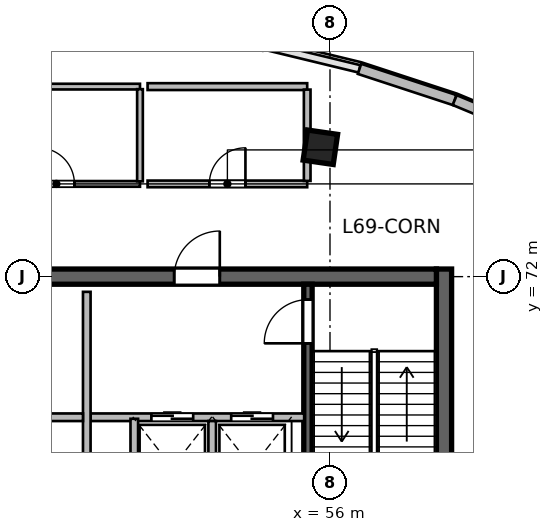
"""IFC4 building model, lengths in metres.
Left out: names, types, materials, properties, quantities, classifications, styles, units other than length and angle.
Written with IfcOpenShell. Run it as: python <this file> out.ifc"""

import sys

from ifc_helpers import new_model, si_unit, direction, frame, frame_2d, origin, origin_2d, place, context, subcontext, project, spatial, rectangle, extrude, source, transform, mapped, element, fill, save


model = new_model("IFC4")
c1 = context("Model", 3, precision=1e-05, world=origin(), true_north=direction((0.0, 1.0)))
c2 = subcontext(c1, "Body", "Model", "MODEL_VIEW")
j1 = project(units=[si_unit("LENGTHUNIT", "METRE"), si_unit("PLANEANGLEUNIT", "RADIAN")], contexts=[c1])
p1 = place(None, origin())
s1 = spatial("IfcSite", under=j1, at=p1, CompositionType="ELEMENT")
p2 = place(p1, origin())
s2 = spatial("IfcBuilding", under=s1, at=p2, CompositionType="ELEMENT")
p3 = place(p2, frame((0.0, 0.0, 283.5)))
s3 = spatial("IfcBuildingStorey", under=s2, at=p3, CompositionType="ELEMENT", Elevation=283.5)
m1 = source(origin(), c2, "Body", "SweptSolid", [
    extrude(rectangle(XDim=12.0, YDim=0.4, at=frame_2d((6.0, 0.0))), origin(), (0.0, 0.0, 1.0), 3.9),
])
p4 = place(p3, frame((59.0, 60.2, 0.0), z_axis=(0.0, 0.0, 1.0), x_axis=(0.0, 1.0, 0.0)))
e1 = element("IfcWall", 1, at=p4, inside=s3, PredefinedType="SHEAR", context=c2, shape_type="MappedRepresentation", body=[
    mapped(m1, transform((0.0, 0.0, 0.0), scale=1.0)),
])
m2 = source(origin(), c2, "Body", "SweptSolid", [
    extrude(rectangle(XDim=21.6, YDim=0.4, at=frame_2d((10.8, 0.0))), origin(), (0.0, 0.0, 1.0), 3.9),
])
p5 = place(p3, frame((37.2, 72.0, 0.0), z_axis=(0.0, 0.0, 1.0), x_axis=(1.0, 0.0, 0.0)))
e2 = element("IfcWall", 2, at=p5, inside=s3, PredefinedType="SHEAR", context=c2, shape_type="MappedRepresentation", body=[
    mapped(m2, transform((0.0, 0.0, 0.0), scale=1.0)),
])
p6 = place(p5, frame((1.2, 0.0, 0.0)))
e3 = element("IfcOpeningElement", 3, at=p6, cuts=e2, PredefinedType="OPENING", context=c2, shape_type="SweptSolid", body=[
    extrude(rectangle(XDim=0.9, YDim=2.1, at=frame_2d((0.45, 1.05))), frame((0.0, 0.21, 0.0), z_axis=(0.0, -1.0, 0.0), x_axis=(1.0, 0.0, 0.0)), (0.0, 0.0, 1.0), 0.42),
])
p7 = place(p5, frame((14.7, 0.0, 0.0)))
e4 = element("IfcOpeningElement", 4, at=p7, cuts=e2, PredefinedType="OPENING", context=c2, shape_type="SweptSolid", body=[
    extrude(rectangle(XDim=1.2, YDim=2.15, at=frame_2d((0.6, 1.075))), frame((0.0, 0.21, 0.0), z_axis=(0.0, -1.0, 0.0), x_axis=(1.0, 0.0, 0.0)), (0.0, 0.0, 1.0), 0.42),
])
p8 = place(p5, frame((4.15, 0.0, 0.0)))
e5 = element("IfcOpeningElement", 5, at=p8, cuts=e2, PredefinedType="OPENING", context=c2, shape_type="SweptSolid", body=[
    extrude(rectangle(XDim=1.3, YDim=2.15, at=frame_2d((0.65, 1.075))), frame((0.0, 0.21, 0.0), z_axis=(0.0, -1.0, 0.0), x_axis=(1.0, 0.0, 0.0)), (0.0, 0.0, 1.0), 0.42),
])
p9 = place(p5, frame((7.25, 0.0, 0.0)))
e6 = element("IfcOpeningElement", 6, at=p9, cuts=e2, PredefinedType="OPENING", context=c2, shape_type="SweptSolid", body=[
    extrude(rectangle(XDim=0.9, YDim=2.1, at=frame_2d((0.45, 1.05))), frame((0.0, 0.21, 0.0), z_axis=(0.0, -1.0, 0.0), x_axis=(1.0, 0.0, 0.0)), (0.0, 0.0, 1.0), 0.42),
])
m3 = source(origin(), c2, "Body", "SweptSolid", [
    extrude(rectangle(XDim=11.2, YDim=0.22, at=frame_2d((5.6, 0.0))), origin(), (0.0, 0.0, 1.0), 3.9),
])
p10 = place(p3, frame((55.42, 60.6, 0.0), z_axis=(0.0, 0.0, 1.0), x_axis=(0.0, 1.0, 0.0)))
e7 = element("IfcWall", 7, at=p10, inside=s3, PredefinedType="SHEAR", context=c2, shape_type="MappedRepresentation", body=[
    mapped(m3, transform((0.0, 0.0, 0.0), scale=1.0)),
])
p11 = place(p10, frame((9.645, 0.0, 0.0)))
e8 = element("IfcOpeningElement", 8, at=p11, cuts=e7, PredefinedType="OPENING", context=c2, shape_type="SweptSolid", body=[
    extrude(rectangle(XDim=1.15, YDim=2.15, at=frame_2d((0.575, 1.075))), frame((0.0, 0.12, 0.0), z_axis=(0.0, -1.0, 0.0), x_axis=(1.0, 0.0, 0.0)), (0.0, 0.0, 1.0), 0.24),
])
m4 = source(origin(), c2, "Body", "SweptSolid", [
    extrude(rectangle(XDim=0.8, YDim=0.8, at=origin_2d()), origin(), (0.0, 0.0, 1.0), 3.9),
])
p12 = place(p3, frame((55.747, 75.404, 0.0), z_axis=(0.0, 0.0, 1.0), x_axis=(0.143492621991, 0.98965138682, 0.0)))
e9 = element("IfcColumn", 9, at=p12, inside=s3, PredefinedType="COLUMN", context=c2, shape_type="MappedRepresentation", body=[
    mapped(m4, transform((0.0, 0.0, 0.0), scale=1.0)),
])
m5 = source(origin(), c2, "Body", "SweptSolid", [
    extrude(rectangle(XDim=2.636, YDim=0.28, at=frame_2d((1.318, 0.0))), origin(), (0.0, 0.0, 1.0), 3.64),
])
p13 = place(p3, frame((56.777, 77.467, 0.0), z_axis=(0.0, 0.0, 1.0), x_axis=(0.950200321617, -0.311639774097, 0.0)))
e10 = element("IfcWall", 10, at=p13, inside=s3, PredefinedType="SOLIDWALL", context=c2, shape_type="MappedRepresentation", body=[
    mapped(m5, transform((0.0, 0.0, 0.0), scale=1.0)),
])
m6 = source(origin(), c2, "Body", "SweptSolid", [
    extrude(rectangle(XDim=2.668, YDim=0.28, at=frame_2d((1.334, 0.0))), origin(), (0.0, 0.0, 1.0), 3.64),
])
p14 = place(p3, frame((59.281, 76.645, 0.0), z_axis=(0.0, 0.0, 1.0), x_axis=(0.923290633029, -0.384102078828, 0.0)))
e11 = element("IfcWall", 11, at=p14, inside=s3, PredefinedType="SOLIDWALL", context=c2, shape_type="MappedRepresentation", body=[
    mapped(m6, transform((0.0, 0.0, 0.0), scale=1.0)),
])
m7 = source(origin(), c2, "Body", "SweptSolid", [
    extrude(rectangle(XDim=5.62, YDim=0.2, at=frame_2d((2.81, 0.0))), origin(), (0.0, 0.0, 1.0), 3.64),
])
p15 = place(p3, frame((49.7, 68.3, 0.0), z_axis=(0.0, 0.0, 1.0), x_axis=(1.0, 0.0, 0.0)))
e12 = element("IfcWall", 12, at=p15, inside=s3, PredefinedType="SOLIDWALL", context=c2, shape_type="MappedRepresentation", body=[
    mapped(m7, transform((0.0, 0.0, 0.0), scale=1.0)),
])
p16 = place(p15, frame((1.6, 0.0, 0.0)))
e13 = element("IfcOpeningElement", 13, at=p16, cuts=e12, PredefinedType="OPENING", context=c2, shape_type="SweptSolid", body=[
    extrude(rectangle(XDim=1.1, YDim=2.15, at=frame_2d((0.55, 1.075))), frame((0.0, 0.11, 0.0), z_axis=(0.0, -1.0, 0.0), x_axis=(1.0, 0.0, 0.0)), (0.0, 0.0, 1.0), 0.22),
])
p17 = place(p15, frame((3.7, 0.0, 0.0)))
e14 = element("IfcOpeningElement", 14, at=p17, cuts=e12, PredefinedType="OPENING", context=c2, shape_type="SweptSolid", body=[
    extrude(rectangle(XDim=1.1, YDim=2.15, at=frame_2d((0.55, 1.075))), frame((0.0, 0.11, 0.0), z_axis=(0.0, -1.0, 0.0), x_axis=(1.0, 0.0, 0.0)), (0.0, 0.0, 1.0), 0.22),
])
m8 = source(origin(), c2, "Body", "SweptSolid", [
    extrude(rectangle(XDim=5.8, YDim=0.2, at=frame_2d((2.9, 0.0))), origin(), (0.0, 0.0, 1.0), 3.64),
])
p18 = place(p3, frame((49.6, 65.8, 0.0), z_axis=(0.0, 0.0, 1.0), x_axis=(0.0, 1.0, 0.0)))
e15 = element("IfcWall", 15, at=p18, inside=s3, PredefinedType="SOLIDWALL", context=c2, shape_type="MappedRepresentation", body=[
    mapped(m8, transform((0.0, 0.0, 0.0), scale=1.0)),
])
m9 = source(origin(), c2, "Body", "SweptSolid", [
    extrude(rectangle(XDim=2.58, YDim=0.2, at=frame_2d((1.29, 0.0))), origin(), (0.0, 0.0, 1.0), 3.64),
])
p19 = place(p3, frame((50.85, 65.68, 0.0), z_axis=(0.0, 0.0, 1.0), x_axis=(0.0, 1.0, 0.0)))
e16 = element("IfcWall", 16, at=p19, inside=s3, PredefinedType="SOLIDWALL", context=c2, shape_type="MappedRepresentation", body=[
    mapped(m9, transform((0.0, 0.0, 0.0), scale=1.0)),
])
m10 = source(origin(), c2, "Body", "SweptSolid", [
    extrude(rectangle(XDim=2.4, YDim=0.2, at=frame_2d((1.2, 0.0))), origin(), (0.0, 0.0, 1.0), 3.64),
])
p20 = place(p3, frame((52.9, 65.8, 0.0), z_axis=(0.0, 0.0, 1.0), x_axis=(0.0, 1.0, 0.0)))
e17 = element("IfcWall", 17, at=p20, inside=s3, PredefinedType="SOLIDWALL", context=c2, shape_type="MappedRepresentation", body=[
    mapped(m10, transform((0.0, 0.0, 0.0), scale=1.0)),
])
m11 = source(origin(), c2, "Body", "SweptSolid", [
    extrude(rectangle(XDim=8.8, YDim=0.2, at=frame_2d((4.4, 0.0))), origin(), (0.0, 0.0, 1.0), 3.64),
])
p21 = place(p3, frame((40.7, 68.3, 0.0), z_axis=(0.0, 0.0, 1.0), x_axis=(1.0, 0.0, 0.0)))
e18 = element("IfcWall", 18, at=p21, inside=s3, PredefinedType="SOLIDWALL", context=c2, shape_type="MappedRepresentation", body=[
    mapped(m11, transform((0.0, 0.0, 0.0), scale=1.0)),
])
m12 = source(origin(), c2, "Body", "SweptSolid", [
    extrude(rectangle(XDim=4.4, YDim=0.15, at=frame_2d((2.2, 0.0))), origin(), (0.0, 0.0, 1.0), 3.64),
])
p22 = place(p3, frame((46.6, 74.44, 0.0), z_axis=(0.0, 0.0, 1.0), x_axis=(1.0, 0.0, 0.0)))
e19 = element("IfcWall", 19, at=p22, inside=s3, PredefinedType="PARTITIONING", context=c2, shape_type="MappedRepresentation", body=[
    mapped(m12, transform((0.0, 0.0, 0.0), scale=1.0)),
])
p23 = place(p22, frame((1.725, 0.0, 0.0)))
e20 = element("IfcOpeningElement", 20, at=p23, cuts=e19, PredefinedType="OPENING", context=c2, shape_type="SweptSolid", body=[
    extrude(rectangle(XDim=0.95, YDim=2.1, at=frame_2d((0.475, 1.05))), frame((0.0, 0.085, 0.0), z_axis=(0.0, -1.0, 0.0), x_axis=(1.0, 0.0, 0.0)), (0.0, 0.0, 1.0), 0.17),
])
p24 = place(p3, frame((46.6, 77.0, 0.0), z_axis=(0.0, 0.0, 1.0), x_axis=(1.0, 0.0, 0.0)))
e21 = element("IfcWall", 21, at=p24, inside=s3, PredefinedType="PARTITIONING", context=c2, shape_type="MappedRepresentation", body=[
    mapped(m12, transform((0.0, 0.0, 0.0), scale=1.0)),
])
m13 = source(origin(), c2, "Body", "SweptSolid", [
    extrude(rectangle(XDim=2.425, YDim=0.15, at=frame_2d((1.212, 0.0))), origin(), (0.0, 0.0, 1.0), 3.64),
])
p25 = place(p3, frame((51.0, 74.508, 0.0), z_axis=(0.0, 0.0, 1.0), x_axis=(0.0, 1.0, 0.0)))
e22 = element("IfcWall", 22, at=p25, inside=s3, PredefinedType="PARTITIONING", context=c2, shape_type="MappedRepresentation", body=[
    mapped(m13, transform((0.0, 0.0, 0.0), scale=1.0)),
])
m14 = source(origin(), c2, "Body", "SweptSolid", [
    extrude(rectangle(XDim=4.2, YDim=0.175, at=frame_2d((2.1, 0.0))), origin(), (0.0, 0.0, 1.0), 3.64),
])
p26 = place(p3, frame((51.2, 74.44, 0.0), z_axis=(0.0, 0.0, 1.0), x_axis=(1.0, 0.0, 0.0)))
e23 = element("IfcWall", 23, at=p26, inside=s3, PredefinedType="PARTITIONING", context=c2, shape_type="MappedRepresentation", body=[
    mapped(m14, transform((0.0, 0.0, 0.0), scale=1.0)),
])
p27 = place(p26, frame((1.625, 0.0, 0.0)))
e24 = element("IfcOpeningElement", 24, at=p27, cuts=e23, PredefinedType="OPENING", context=c2, shape_type="SweptSolid", body=[
    extrude(rectangle(XDim=0.95, YDim=2.12, at=frame_2d((0.475, 1.06))), frame((0.0, 0.098, 0.0), z_axis=(0.0, -1.0, 0.0), x_axis=(1.0, 0.0, 0.0)), (0.0, 0.0, 1.0), 0.195),
])
m15 = source(origin(), c2, "Body", "SweptSolid", [
    extrude(rectangle(XDim=4.2, YDim=0.18, at=frame_2d((2.1, 0.0))), origin(), (0.0, 0.0, 1.0), 3.64),
])
p28 = place(p3, frame((51.2, 77.0, 0.0), z_axis=(0.0, 0.0, 1.0), x_axis=(1.0, 0.0, 0.0)))
e25 = element("IfcWall", 25, at=p28, inside=s3, PredefinedType="PLUMBINGWALL", context=c2, shape_type="MappedRepresentation", body=[
    mapped(m15, transform((0.0, 0.0, 0.0), scale=1.0)),
])
m16 = source(origin(), c2, "Body", "SweptSolid", [
    extrude(rectangle(XDim=2.403, YDim=0.175, at=frame_2d((1.201, 0.0))), origin(), (0.0, 0.0, 1.0), 3.64),
])
p29 = place(p3, frame((55.4, 74.519, 0.0), z_axis=(0.0, 0.0, 1.0), x_axis=(0.0, 1.0, 0.0)))
e26 = element("IfcWall", 26, at=p29, inside=s3, PredefinedType="PARTITIONING", context=c2, shape_type="MappedRepresentation", body=[
    mapped(m16, transform((0.0, 0.0, 0.0), scale=1.0)),
])
m17 = source(origin(), c2, "Body", "SweptSolid", [
    extrude(rectangle(XDim=12.307, YDim=0.195, at=frame_2d((6.153, 0.0))), origin(), (0.0, 0.0, 1.0), 3.64),
])
p30 = place(p3, frame((59.5, 63.216, 0.0), z_axis=(0.0, 0.0, 1.0), x_axis=(0.268768150257, 0.96320490105, 0.0)))
e27 = element("IfcWall", 27, at=p30, inside=s3, PredefinedType="PARTITIONING", context=c2, shape_type="MappedRepresentation", body=[
    mapped(m17, transform((0.0, 0.0, 0.0), scale=1.0)),
])
m18 = source(origin(), c2, "Body", "SweptSolid", [
    extrude(rectangle(XDim=1.15, YDim=2.15, at=frame_2d((0.575, 1.075))), frame((0.0, 0.025, 0.0), z_axis=(0.0, -1.0, 0.0), x_axis=(1.0, 0.0, 0.0)), (0.0, 0.0, 1.0), 0.05),
])
p31 = place(p11, origin())
e28 = element("IfcDoor", 28, at=p31, inside=s3, OperationType="SINGLE_SWING_LEFT", PredefinedType="DOOR", context=c2, shape_type="MappedRepresentation", body=[
    mapped(m18, transform((0.0, 0.0, 0.0), scale=1.0)),
])
fill(e8, e28)
m19 = source(origin(), c2, "Body", "SweptSolid", [
    extrude(rectangle(XDim=1.2, YDim=2.15, at=frame_2d((0.6, 1.075))), frame((0.0, 0.025, 0.0), z_axis=(0.0, -1.0, 0.0), x_axis=(1.0, 0.0, 0.0)), (0.0, 0.0, 1.0), 0.05),
])
p32 = place(p7, origin())
e29 = element("IfcDoor", 29, at=p32, inside=s3, OperationType="SINGLE_SWING_RIGHT", PredefinedType="DOOR", context=c2, shape_type="MappedRepresentation", body=[
    mapped(m19, transform((0.0, 0.0, 0.0), scale=1.0)),
])
fill(e4, e29)
m20 = source(origin(), c2, "Body", "SweptSolid", [
    extrude(rectangle(XDim=1.1, YDim=2.15, at=frame_2d((0.55, 1.075))), frame((0.0, 0.025, 0.0), z_axis=(0.0, -1.0, 0.0), x_axis=(1.0, 0.0, 0.0)), (0.0, 0.0, 1.0), 0.05),
])
p33 = place(p16, origin())
e30 = element("IfcDoor", 30, at=p33, inside=s3, OperationType="DOUBLE_DOOR_SLIDING", PredefinedType="DOOR", context=c2, shape_type="MappedRepresentation", body=[
    mapped(m20, transform((0.0, 0.0, 0.0), scale=1.0)),
])
fill(e13, e30)
p34 = place(p17, origin())
e31 = element("IfcDoor", 31, at=p34, inside=s3, OperationType="DOUBLE_DOOR_SLIDING", PredefinedType="DOOR", context=c2, shape_type="MappedRepresentation", body=[
    mapped(m20, transform((0.0, 0.0, 0.0), scale=1.0)),
])
fill(e14, e31)
m21 = source(origin(), c2, "Body", "SweptSolid", [
    extrude(rectangle(XDim=0.95, YDim=2.1, at=frame_2d((0.475, 1.05))), frame((0.0, 0.025, 0.0), z_axis=(0.0, -1.0, 0.0), x_axis=(1.0, 0.0, 0.0)), (0.0, 0.0, 1.0), 0.05),
])
p35 = place(p23, origin())
e32 = element("IfcDoor", 32, at=p35, inside=s3, OperationType="SINGLE_SWING_LEFT", PredefinedType="DOOR", context=c2, shape_type="MappedRepresentation", body=[
    mapped(m21, transform((0.0, 0.0, 0.0), scale=1.0)),
])
fill(e20, e32)
m22 = source(origin(), c2, "Body", "SweptSolid", [
    extrude(rectangle(XDim=0.95, YDim=2.12, at=frame_2d((0.475, 1.06))), frame((0.0, 0.025, 0.0), z_axis=(0.0, -1.0, 0.0), x_axis=(1.0, 0.0, 0.0)), (0.0, 0.0, 1.0), 0.05),
])
p36 = place(p27, origin())
e33 = element("IfcDoor", 33, at=p36, inside=s3, OperationType="SINGLE_SWING_RIGHT", PredefinedType="DOOR", context=c2, shape_type="MappedRepresentation", body=[
    mapped(m22, transform((0.0, 0.0, 0.0), scale=1.0)),
])
fill(e24, e33)
save(model, sys.argv[1])
